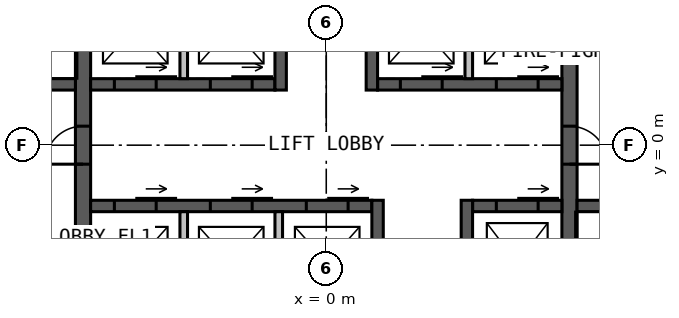
"""IFC4 building model, lengths in metres.
Left out: names, types, materials, properties, quantities, classifications, styles, units other than length and angle.
Written with IfcOpenShell. Run it as: python <this file> out.ifc"""

import sys

from ifc_helpers import new_model, si_unit, direction, frame, frame_2d, origin, place, context, subcontext, project, spatial, rectangle, extrude, element, fill, save


model = new_model("IFC4")
c1 = context("Model", 3, precision=1e-05, world=origin(), true_north=direction((0.0, 1.0)))
c2 = subcontext(c1, "Body", "Model", "MODEL_VIEW")
j1 = project(units=[si_unit("LENGTHUNIT", "METRE"), si_unit("PLANEANGLEUNIT", "RADIAN")], contexts=[c1])
p1 = place(None, origin())
s1 = spatial("IfcSite", under=j1, at=p1, CompositionType="ELEMENT")
p2 = place(p1, origin())
s2 = spatial("IfcBuilding", under=s1, at=p2, CompositionType="ELEMENT")
p3 = place(p2, frame((0.0, 0.0, 220.0)))
s3 = spatial("IfcBuildingStorey", under=s2, at=p3, CompositionType="ELEMENT", Elevation=220.0)
p4 = place(p3, frame((-6.4, -9.6, 0.0), z_axis=(0.0, 0.0, 1.0), x_axis=(0.0, 1.0, 0.0)))
e1 = element("IfcWall", 1, at=p4, inside=s3, PredefinedType="SOLIDWALL", context=c2, shape_type="SweptSolid", body=[
    extrude(rectangle(XDim=19.2, YDim=0.4, at=frame_2d((9.6, 0.0))), origin(), (0.0, 0.0, 1.0), 4.0),
])
p5 = place(p4, frame((9.1, 0.0, 0.0)))
e2 = element("IfcOpeningElement", 2, at=p5, cuts=e1, PredefinedType="OPENING", context=c2, shape_type="SweptSolid", body=[
    extrude(rectangle(XDim=1.0, YDim=2.2, at=frame_2d((0.5, 1.1))), frame((0.0, 0.21, 0.0), z_axis=(0.0, -1.0, 0.0), x_axis=(1.0, 0.0, 0.0)), (0.0, 0.0, 1.0), 0.42),
])
p6 = place(p3, frame((6.4, 9.6, 0.0), z_axis=(0.0, 0.0, 1.0), x_axis=(0.0, -1.0, 0.0)))
e3 = element("IfcWall", 3, at=p6, inside=s3, PredefinedType="SOLIDWALL", context=c2, shape_type="SweptSolid", body=[
    extrude(rectangle(XDim=19.2, YDim=0.4, at=frame_2d((9.6, 0.0))), origin(), (0.0, 0.0, 1.0), 4.0),
])
p7 = place(p6, frame((9.1, 0.0, 0.0)))
e4 = element("IfcOpeningElement", 4, at=p7, cuts=e3, PredefinedType="OPENING", context=c2, shape_type="SweptSolid", body=[
    extrude(rectangle(XDim=1.0, YDim=2.2, at=frame_2d((0.5, 1.1))), frame((0.0, 0.21, 0.0), z_axis=(0.0, -1.0, 0.0), x_axis=(1.0, 0.0, 0.0)), (0.0, 0.0, 1.0), 0.42),
])
p8 = place(p3, frame((-6.2, 1.6, 0.0), z_axis=(0.0, 0.0, 1.0), x_axis=(1.0, 0.0, 0.0)))
e5 = element("IfcWall", 5, at=p8, inside=s3, PredefinedType="SOLIDWALL", context=c2, shape_type="SweptSolid", body=[
    extrude(rectangle(XDim=4.85, YDim=0.3, at=frame_2d((2.425, 0.0))), origin(), (0.0, 0.0, 1.0), 4.0),
])
p9 = place(p8, frame((0.625, 0.0, 0.0)))
e6 = element("IfcOpeningElement", 6, at=p9, cuts=e5, PredefinedType="OPENING", context=c2, shape_type="SweptSolid", body=[
    extrude(rectangle(XDim=1.1, YDim=2.2, at=frame_2d((0.55, 1.1))), frame((0.0, 0.16, 0.0), z_axis=(0.0, -1.0, 0.0), x_axis=(1.0, 0.0, 0.0)), (0.0, 0.0, 1.0), 0.32),
])
p10 = place(p8, frame((3.15, 0.0, 0.0)))
e7 = element("IfcOpeningElement", 7, at=p10, cuts=e5, PredefinedType="OPENING", context=c2, shape_type="SweptSolid", body=[
    extrude(rectangle(XDim=1.1, YDim=2.2, at=frame_2d((0.55, 1.1))), frame((0.0, 0.16, 0.0), z_axis=(0.0, -1.0, 0.0), x_axis=(1.0, 0.0, 0.0)), (0.0, 0.0, 1.0), 0.32),
])
p11 = place(p3, frame((1.35, 1.6, 0.0), z_axis=(0.0, 0.0, 1.0), x_axis=(1.0, 0.0, 0.0)))
e8 = element("IfcWall", 8, at=p11, inside=s3, PredefinedType="SOLIDWALL", context=c2, shape_type="SweptSolid", body=[
    extrude(rectangle(XDim=4.85, YDim=0.3, at=frame_2d((2.425, 0.0))), origin(), (0.0, 0.0, 1.0), 4.0),
])
p12 = place(p11, frame((0.6, 0.0, 0.0)))
e9 = element("IfcOpeningElement", 9, at=p12, cuts=e8, PredefinedType="OPENING", context=c2, shape_type="SweptSolid", body=[
    extrude(rectangle(XDim=1.1, YDim=2.2, at=frame_2d((0.55, 1.1))), frame((0.0, 0.16, 0.0), z_axis=(0.0, -1.0, 0.0), x_axis=(1.0, 0.0, 0.0)), (0.0, 0.0, 1.0), 0.32),
])
p13 = place(p11, frame((3.125, 0.0, 0.0)))
e10 = element("IfcOpeningElement", 10, at=p13, cuts=e8, PredefinedType="OPENING", context=c2, shape_type="SweptSolid", body=[
    extrude(rectangle(XDim=1.1, YDim=2.2, at=frame_2d((0.55, 1.1))), frame((0.0, 0.16, 0.0), z_axis=(0.0, -1.0, 0.0), x_axis=(1.0, 0.0, 0.0)), (0.0, 0.0, 1.0), 0.32),
])
p14 = place(p3, frame((-1.2, 1.45, 0.0), z_axis=(0.0, 0.0, 1.0), x_axis=(0.0, 1.0, 0.0)))
e11 = element("IfcWall", 11, at=p14, inside=s3, PredefinedType="SOLIDWALL", context=c2, shape_type="SweptSolid", body=[
    extrude(rectangle(XDim=8.15, YDim=0.3, at=frame_2d((4.075, 0.0))), origin(), (0.0, 0.0, 1.0), 4.0),
])
p15 = place(p14, frame((5.05, 0.0, 0.0)))
e12 = element("IfcOpeningElement", 12, at=p15, cuts=e11, PredefinedType="OPENING", context=c2, shape_type="SweptSolid", body=[
    extrude(rectangle(XDim=1.0, YDim=2.2, at=frame_2d((0.5, 1.1))), frame((0.0, 0.16, 0.0), z_axis=(0.0, -1.0, 0.0), x_axis=(1.0, 0.0, 0.0)), (0.0, 0.0, 1.0), 0.32),
])
p16 = place(p3, frame((1.2, 1.45, 0.0), z_axis=(0.0, 0.0, 1.0), x_axis=(0.0, 1.0, 0.0)))
e13 = element("IfcWall", 13, at=p16, inside=s3, PredefinedType="SOLIDWALL", context=c2, shape_type="SweptSolid", body=[
    extrude(rectangle(XDim=8.15, YDim=0.3, at=frame_2d((4.075, 0.0))), origin(), (0.0, 0.0, 1.0), 4.0),
])
p17 = place(p16, frame((3.8, 0.0, 0.0)))
e14 = element("IfcOpeningElement", 14, at=p17, cuts=e13, PredefinedType="OPENING", context=c2, shape_type="SweptSolid", body=[
    extrude(rectangle(XDim=1.0, YDim=2.2, at=frame_2d((0.5, 1.1))), frame((0.0, 0.16, 0.0), z_axis=(0.0, -1.0, 0.0), x_axis=(1.0, 0.0, 0.0)), (0.0, 0.0, 1.0), 0.32),
])
p18 = place(p16, frame((6.15, 0.0, 0.0)))
e15 = element("IfcOpeningElement", 15, at=p18, cuts=e13, PredefinedType="OPENING", context=c2, shape_type="SweptSolid", body=[
    extrude(rectangle(XDim=1.0, YDim=2.2, at=frame_2d((0.5, 1.1))), frame((0.0, 0.16, 0.0), z_axis=(0.0, -1.0, 0.0), x_axis=(1.0, 0.0, 0.0)), (0.0, 0.0, 1.0), 0.32),
])
p19 = place(p3, frame((-6.2, -1.6, 0.0), z_axis=(0.0, 0.0, 1.0), x_axis=(1.0, 0.0, 0.0)))
e16 = element("IfcWall", 16, at=p19, inside=s3, PredefinedType="SOLIDWALL", context=c2, shape_type="SweptSolid", body=[
    extrude(rectangle(XDim=7.4, YDim=0.3, at=frame_2d((3.7, 0.0))), origin(), (0.0, 0.0, 1.0), 4.0),
])
p20 = place(p19, frame((0.625, 0.0, 0.0)))
e17 = element("IfcOpeningElement", 17, at=p20, cuts=e16, PredefinedType="OPENING", context=c2, shape_type="SweptSolid", body=[
    extrude(rectangle(XDim=1.1, YDim=2.2, at=frame_2d((0.55, 1.1))), frame((0.0, 0.16, 0.0), z_axis=(0.0, -1.0, 0.0), x_axis=(1.0, 0.0, 0.0)), (0.0, 0.0, 1.0), 0.32),
])
p21 = place(p19, frame((3.15, 0.0, 0.0)))
e18 = element("IfcOpeningElement", 18, at=p21, cuts=e16, PredefinedType="OPENING", context=c2, shape_type="SweptSolid", body=[
    extrude(rectangle(XDim=1.1, YDim=2.2, at=frame_2d((0.55, 1.1))), frame((0.0, 0.16, 0.0), z_axis=(0.0, -1.0, 0.0), x_axis=(1.0, 0.0, 0.0)), (0.0, 0.0, 1.0), 0.32),
])
p22 = place(p19, frame((5.675, 0.0, 0.0)))
e19 = element("IfcOpeningElement", 19, at=p22, cuts=e16, PredefinedType="OPENING", context=c2, shape_type="SweptSolid", body=[
    extrude(rectangle(XDim=1.1, YDim=2.2, at=frame_2d((0.55, 1.1))), frame((0.0, 0.16, 0.0), z_axis=(0.0, -1.0, 0.0), x_axis=(1.0, 0.0, 0.0)), (0.0, 0.0, 1.0), 0.32),
])
p23 = place(p3, frame((3.85, -1.6, 0.0), z_axis=(0.0, 0.0, 1.0), x_axis=(1.0, 0.0, 0.0)))
e20 = element("IfcWall", 20, at=p23, inside=s3, PredefinedType="SOLIDWALL", context=c2, shape_type="SweptSolid", body=[
    extrude(rectangle(XDim=2.35, YDim=0.3, at=frame_2d((1.175, 0.0))), origin(), (0.0, 0.0, 1.0), 4.0),
])
p24 = place(p23, frame((0.625, 0.0, 0.0)))
e21 = element("IfcOpeningElement", 21, at=p24, cuts=e20, PredefinedType="OPENING", context=c2, shape_type="SweptSolid", body=[
    extrude(rectangle(XDim=1.1, YDim=2.2, at=frame_2d((0.55, 1.1))), frame((0.0, 0.16, 0.0), z_axis=(0.0, -1.0, 0.0), x_axis=(1.0, 0.0, 0.0)), (0.0, 0.0, 1.0), 0.32),
])
p25 = place(p3, frame((1.35, -1.45, 0.0), z_axis=(0.0, 0.0, 1.0), x_axis=(0.0, -1.0, 0.0)))
e22 = element("IfcWall", 22, at=p25, inside=s3, PredefinedType="SOLIDWALL", context=c2, shape_type="SweptSolid", body=[
    extrude(rectangle(XDim=8.15, YDim=0.3, at=frame_2d((4.075, 0.0))), origin(), (0.0, 0.0, 1.0), 4.0),
])
p26 = place(p25, frame((6.0, 0.0, 0.0)))
e23 = element("IfcOpeningElement", 23, at=p26, cuts=e22, PredefinedType="OPENING", context=c2, shape_type="SweptSolid", body=[
    extrude(rectangle(XDim=1.0, YDim=2.2, at=frame_2d((0.5, 1.1))), frame((0.0, 0.16, 0.0), z_axis=(0.0, -1.0, 0.0), x_axis=(1.0, 0.0, 0.0)), (0.0, 0.0, 1.0), 0.32),
])
p27 = place(p25, frame((3.525, 0.0, 0.0)))
e24 = element("IfcOpeningElement", 24, at=p27, cuts=e22, PredefinedType="OPENING", context=c2, shape_type="SweptSolid", body=[
    extrude(rectangle(XDim=0.9, YDim=2.2, at=frame_2d((0.45, 1.1))), frame((0.0, 0.16, 0.0), z_axis=(0.0, -1.0, 0.0), x_axis=(1.0, 0.0, 0.0)), (0.0, 0.0, 1.0), 0.32),
])
p28 = place(p3, frame((3.7, -1.45, 0.0), z_axis=(0.0, 0.0, 1.0), x_axis=(0.0, -1.0, 0.0)))
e25 = element("IfcWall", 25, at=p28, inside=s3, PredefinedType="SOLIDWALL", context=c2, shape_type="SweptSolid", body=[
    extrude(rectangle(XDim=8.15, YDim=0.3, at=frame_2d((4.075, 0.0))), origin(), (0.0, 0.0, 1.0), 4.0),
])
p29 = place(p28, frame((5.1, 0.0, 0.0)))
e26 = element("IfcOpeningElement", 26, at=p29, cuts=e25, PredefinedType="OPENING", context=c2, shape_type="SweptSolid", body=[
    extrude(rectangle(XDim=0.9, YDim=2.2, at=frame_2d((0.45, 1.1))), frame((0.0, 0.16, 0.0), z_axis=(0.0, -1.0, 0.0), x_axis=(1.0, 0.0, 0.0)), (0.0, 0.0, 1.0), 0.32),
])
p30 = place(p3, frame((-9.6, 1.6, 0.0), z_axis=(0.0, 0.0, 1.0), x_axis=(1.0, 0.0, 0.0)))
e27 = element("IfcWall", 27, at=p30, inside=s3, PredefinedType="SOLIDWALL", context=c2, shape_type="SweptSolid", body=[
    extrude(rectangle(XDim=3.0, YDim=0.3, at=frame_2d((1.5, 0.0))), origin(), (0.0, 0.0, 1.0), 4.0),
])
p31 = place(p30, frame((1.0, 0.0, 0.0)))
e28 = element("IfcOpeningElement", 28, at=p31, cuts=e27, PredefinedType="OPENING", context=c2, shape_type="SweptSolid", body=[
    extrude(rectangle(XDim=1.0, YDim=2.2, at=frame_2d((0.5, 1.1))), frame((0.0, 0.16, 0.0), z_axis=(0.0, -1.0, 0.0), x_axis=(1.0, 0.0, 0.0)), (0.0, 0.0, 1.0), 0.32),
])
p32 = place(p3, frame((6.6, -1.6, 0.0), z_axis=(0.0, 0.0, 1.0), x_axis=(1.0, 0.0, 0.0)))
e29 = element("IfcWall", 29, at=p32, inside=s3, PredefinedType="SOLIDWALL", context=c2, shape_type="SweptSolid", body=[
    extrude(rectangle(XDim=3.0, YDim=0.3, at=frame_2d((1.5, 0.0))), origin(), (0.0, 0.0, 1.0), 4.0),
])
p33 = place(p32, frame((1.0, 0.0, 0.0)))
e30 = element("IfcOpeningElement", 30, at=p33, cuts=e29, PredefinedType="OPENING", context=c2, shape_type="SweptSolid", body=[
    extrude(rectangle(XDim=1.0, YDim=2.2, at=frame_2d((0.5, 1.1))), frame((0.0, 0.16, 0.0), z_axis=(0.0, -1.0, 0.0), x_axis=(1.0, 0.0, 0.0)), (0.0, 0.0, 1.0), 0.32),
])
for number, where, z_axis, x_axis in (
    (31, (-3.75, 1.75, 0.0), (0.0, 0.0, 1.0), (0.0, 1.0, 0.0)),
    (32, (3.75, 1.75, 0.0), (0.0, 0.0, 1.0), (0.0, 1.0, 0.0)),
    (33, (-3.75, -1.75, 0.0), (0.0, 0.0, 1.0), (0.0, -1.0, 0.0)),
    (34, (-1.25, -1.75, 0.0), (0.0, 0.0, 1.0), (0.0, -1.0, 0.0)),
):
    element("IfcWall", number, at=place(p3, frame(where, z_axis=z_axis, x_axis=x_axis)), inside=s3, PredefinedType="SOLIDWALL", context=c2, shape_type="SweptSolid", body=[
        extrude(rectangle(XDim=2.7, YDim=0.2, at=frame_2d((1.35, 0.0))), origin(), (0.0, 0.0, 1.0), 3.75),
    ])
p34 = place(p5, origin())
e35 = element("IfcDoor", 35, at=p34, inside=s3, OperationType="SINGLE_SWING_LEFT", PredefinedType="DOOR", context=c2, shape_type="SweptSolid", body=[
    extrude(rectangle(XDim=1.0, YDim=2.2, at=frame_2d((0.5, 1.1))), frame((0.0, 0.025, 0.0), z_axis=(0.0, -1.0, 0.0), x_axis=(1.0, 0.0, 0.0)), (0.0, 0.0, 1.0), 0.05),
])
fill(e2, e35)
p35 = place(p7, origin())
e36 = element("IfcDoor", 36, at=p35, inside=s3, OperationType="SINGLE_SWING_RIGHT", PredefinedType="DOOR", context=c2, shape_type="SweptSolid", body=[
    extrude(rectangle(XDim=1.0, YDim=2.2, at=frame_2d((0.5, 1.1))), frame((0.0, 0.025, 0.0), z_axis=(0.0, -1.0, 0.0), x_axis=(1.0, 0.0, 0.0)), (0.0, 0.0, 1.0), 0.05),
])
fill(e4, e36)
p36 = place(p9, origin())
e37 = element("IfcDoor", 37, at=p36, inside=s3, OperationType="SLIDING_TO_LEFT", PredefinedType="DOOR", context=c2, shape_type="SweptSolid", body=[
    extrude(rectangle(XDim=1.1, YDim=2.2, at=frame_2d((0.55, 1.1))), frame((0.0, 0.025, 0.0), z_axis=(0.0, -1.0, 0.0), x_axis=(1.0, 0.0, 0.0)), (0.0, 0.0, 1.0), 0.05),
])
fill(e6, e37)
p37 = place(p10, origin())
e38 = element("IfcDoor", 38, at=p37, inside=s3, OperationType="SLIDING_TO_LEFT", PredefinedType="DOOR", context=c2, shape_type="SweptSolid", body=[
    extrude(rectangle(XDim=1.1, YDim=2.2, at=frame_2d((0.55, 1.1))), frame((0.0, 0.025, 0.0), z_axis=(0.0, -1.0, 0.0), x_axis=(1.0, 0.0, 0.0)), (0.0, 0.0, 1.0), 0.05),
])
fill(e7, e38)
p38 = place(p12, origin())
e39 = element("IfcDoor", 39, at=p38, inside=s3, OperationType="SLIDING_TO_LEFT", PredefinedType="DOOR", context=c2, shape_type="SweptSolid", body=[
    extrude(rectangle(XDim=1.1, YDim=2.2, at=frame_2d((0.55, 1.1))), frame((0.0, 0.025, 0.0), z_axis=(0.0, -1.0, 0.0), x_axis=(1.0, 0.0, 0.0)), (0.0, 0.0, 1.0), 0.05),
])
fill(e9, e39)
p39 = place(p13, origin())
e40 = element("IfcDoor", 40, at=p39, inside=s3, OperationType="SLIDING_TO_LEFT", PredefinedType="DOOR", context=c2, shape_type="SweptSolid", body=[
    extrude(rectangle(XDim=1.1, YDim=2.2, at=frame_2d((0.55, 1.1))), frame((0.0, 0.025, 0.0), z_axis=(0.0, -1.0, 0.0), x_axis=(1.0, 0.0, 0.0)), (0.0, 0.0, 1.0), 0.05),
])
fill(e10, e40)
p40 = place(p20, origin())
e41 = element("IfcDoor", 41, at=p40, inside=s3, OperationType="SLIDING_TO_LEFT", PredefinedType="DOOR", context=c2, shape_type="SweptSolid", body=[
    extrude(rectangle(XDim=1.1, YDim=2.2, at=frame_2d((0.55, 1.1))), frame((0.0, 0.025, 0.0), z_axis=(0.0, -1.0, 0.0), x_axis=(1.0, 0.0, 0.0)), (0.0, 0.0, 1.0), 0.05),
])
fill(e17, e41)
p41 = place(p21, origin())
e42 = element("IfcDoor", 42, at=p41, inside=s3, OperationType="SLIDING_TO_LEFT", PredefinedType="DOOR", context=c2, shape_type="SweptSolid", body=[
    extrude(rectangle(XDim=1.1, YDim=2.2, at=frame_2d((0.55, 1.1))), frame((0.0, 0.025, 0.0), z_axis=(0.0, -1.0, 0.0), x_axis=(1.0, 0.0, 0.0)), (0.0, 0.0, 1.0), 0.05),
])
fill(e18, e42)
p42 = place(p22, origin())
e43 = element("IfcDoor", 43, at=p42, inside=s3, OperationType="SLIDING_TO_LEFT", PredefinedType="DOOR", context=c2, shape_type="SweptSolid", body=[
    extrude(rectangle(XDim=1.1, YDim=2.2, at=frame_2d((0.55, 1.1))), frame((0.0, 0.025, 0.0), z_axis=(0.0, -1.0, 0.0), x_axis=(1.0, 0.0, 0.0)), (0.0, 0.0, 1.0), 0.05),
])
fill(e19, e43)
p43 = place(p24, origin())
e44 = element("IfcDoor", 44, at=p43, inside=s3, OperationType="SLIDING_TO_LEFT", PredefinedType="DOOR", context=c2, shape_type="SweptSolid", body=[
    extrude(rectangle(XDim=1.1, YDim=2.2, at=frame_2d((0.55, 1.1))), frame((0.0, 0.025, 0.0), z_axis=(0.0, -1.0, 0.0), x_axis=(1.0, 0.0, 0.0)), (0.0, 0.0, 1.0), 0.05),
])
fill(e21, e44)
save(model, sys.argv[1])
